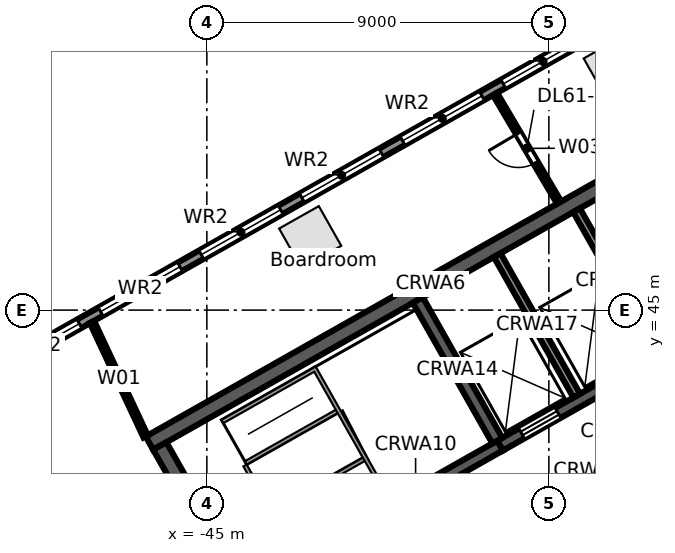
"""IFC4 building model, lengths in metres.
Left out: names, types, materials, properties, quantities, classifications, styles, units other than length and angle.
Written with IfcOpenShell. Run it as: python <this file> out.ifc"""

import sys

from ifc_helpers import new_model, si_unit, direction, frame, frame_2d, origin, origin_2d, place, context, subcontext, project, spatial, rectangle, extrude, element, fill, save


model = new_model("IFC4")
c1 = context("Model", 3, precision=1e-05, world=origin(), true_north=direction((0.0, 1.0)))
c2 = subcontext(c1, "Body", "Model", "MODEL_VIEW")
j1 = project(units=[si_unit("LENGTHUNIT", "METRE"), si_unit("PLANEANGLEUNIT", "RADIAN")], contexts=[c1])
p1 = place(None, origin())
s1 = spatial("IfcSite", under=j1, at=p1, CompositionType="ELEMENT")
p2 = place(p1, origin())
s2 = spatial("IfcBuilding", under=s1, at=p2, CompositionType="ELEMENT")
p3 = place(p2, frame((0.0, 0.0, 277.9)))
s3 = spatial("IfcBuildingStorey", under=s2, at=p3, CompositionType="ELEMENT", Elevation=277.9)
p4 = place(p3, frame((-34.334, 51.414, 0.0), z_axis=(0.0, 0.0, 1.0), x_axis=(-0.87035569594, -0.492423560103, 0.0)))
e1 = element("IfcColumn", 1, at=p4, inside=s3, PredefinedType="COLUMN", context=c2, shape_type="SweptSolid", body=[
    extrude(rectangle(XDim=1.1, YDim=1.1, at=origin_2d()), origin(), (0.0, 0.0, 1.0), 3.8),
])
p5 = place(p3, frame((-42.28, 46.919, 0.0), z_axis=(0.0, 0.0, 1.0), x_axis=(-0.87035569594, -0.492423560103, 0.0)))
e2 = element("IfcColumn", 2, at=p5, inside=s3, PredefinedType="COLUMN", context=c2, shape_type="SweptSolid", body=[
    extrude(rectangle(XDim=1.2, YDim=1.2, at=origin_2d()), origin(), (0.0, 0.0, 1.0), 3.8),
])
p6 = place(p3, frame((-58.732, 38.771, 0.0), z_axis=(0.0, 0.0, 1.0), x_axis=(0.870355615581, 0.492423702137, 0.0)))
e3 = element("IfcWall", 3, at=p6, inside=s3, PredefinedType="STANDARD", context=c2, shape_type="SweptSolid", body=[
    extrude(rectangle(XDim=64.052, YDim=0.25, at=frame_2d((32.026, 0.0))), origin(), (0.0, 0.0, 1.0), 3.52),
])
p7 = place(p6, frame((61.259, 0.0, 0.8)))
e4 = element("IfcOpeningElement", 4, at=p7, cuts=e3, PredefinedType="OPENING", context=c2, shape_type="SweptSolid", body=[
    extrude(rectangle(XDim=2.4, YDim=2.2, at=frame_2d((1.2, 1.1))), frame((0.0, 0.135, 0.0), z_axis=(0.0, -1.0, 0.0), x_axis=(1.0, 0.0, 0.0)), (0.0, 0.0, 1.0), 0.27),
])
p8 = place(p6, frame((58.216, 0.0, 0.8)))
e5 = element("IfcOpeningElement", 5, at=p8, cuts=e3, PredefinedType="OPENING", context=c2, shape_type="SweptSolid", body=[
    extrude(rectangle(XDim=2.4, YDim=2.2, at=frame_2d((1.2, 1.1))), frame((0.0, 0.135, 0.0), z_axis=(0.0, -1.0, 0.0), x_axis=(1.0, 0.0, 0.0)), (0.0, 0.0, 1.0), 0.27),
])
p9 = place(p6, frame((55.173, 0.0, 0.8)))
e6 = element("IfcOpeningElement", 6, at=p9, cuts=e3, PredefinedType="OPENING", context=c2, shape_type="SweptSolid", body=[
    extrude(rectangle(XDim=2.4, YDim=2.2, at=frame_2d((1.2, 1.1))), frame((0.0, 0.135, 0.0), z_axis=(0.0, -1.0, 0.0), x_axis=(1.0, 0.0, 0.0)), (0.0, 0.0, 1.0), 0.27),
])
p10 = place(p6, frame((52.129, 0.0, 0.8)))
e7 = element("IfcOpeningElement", 7, at=p10, cuts=e3, PredefinedType="OPENING", context=c2, shape_type="SweptSolid", body=[
    extrude(rectangle(XDim=2.4, YDim=2.2, at=frame_2d((1.2, 1.1))), frame((0.0, 0.135, 0.0), z_axis=(0.0, -1.0, 0.0), x_axis=(1.0, 0.0, 0.0)), (0.0, 0.0, 1.0), 0.27),
])
p11 = place(p6, frame((49.086, 0.0, 0.8)))
e8 = element("IfcOpeningElement", 8, at=p11, cuts=e3, PredefinedType="OPENING", context=c2, shape_type="SweptSolid", body=[
    extrude(rectangle(XDim=2.4, YDim=2.2, at=frame_2d((1.2, 1.1))), frame((0.0, 0.135, 0.0), z_axis=(0.0, -1.0, 0.0), x_axis=(1.0, 0.0, 0.0)), (0.0, 0.0, 1.0), 0.27),
])
p12 = place(p6, frame((46.043, 0.0, 0.8)))
e9 = element("IfcOpeningElement", 9, at=p12, cuts=e3, PredefinedType="OPENING", context=c2, shape_type="SweptSolid", body=[
    extrude(rectangle(XDim=2.4, YDim=2.2, at=frame_2d((1.2, 1.1))), frame((0.0, 0.135, 0.0), z_axis=(0.0, -1.0, 0.0), x_axis=(1.0, 0.0, 0.0)), (0.0, 0.0, 1.0), 0.27),
])
p13 = place(p6, frame((43.0, 0.0, 0.8)))
e10 = element("IfcOpeningElement", 10, at=p13, cuts=e3, PredefinedType="OPENING", context=c2, shape_type="SweptSolid", body=[
    extrude(rectangle(XDim=2.4, YDim=2.2, at=frame_2d((1.2, 1.1))), frame((0.0, 0.135, 0.0), z_axis=(0.0, -1.0, 0.0), x_axis=(1.0, 0.0, 0.0)), (0.0, 0.0, 1.0), 0.27),
])
p14 = place(p6, frame((39.956, 0.0, 0.8)))
e11 = element("IfcOpeningElement", 11, at=p14, cuts=e3, PredefinedType="OPENING", context=c2, shape_type="SweptSolid", body=[
    extrude(rectangle(XDim=2.4, YDim=2.2, at=frame_2d((1.2, 1.1))), frame((0.0, 0.135, 0.0), z_axis=(0.0, -1.0, 0.0), x_axis=(1.0, 0.0, 0.0)), (0.0, 0.0, 1.0), 0.27),
])
p15 = place(p6, frame((36.913, 0.0, 0.8)))
e12 = element("IfcOpeningElement", 12, at=p15, cuts=e3, PredefinedType="OPENING", context=c2, shape_type="SweptSolid", body=[
    extrude(rectangle(XDim=2.4, YDim=2.2, at=frame_2d((1.2, 1.1))), frame((0.0, 0.135, 0.0), z_axis=(0.0, -1.0, 0.0), x_axis=(1.0, 0.0, 0.0)), (0.0, 0.0, 1.0), 0.27),
])
p16 = place(p6, frame((33.87, 0.0, 0.8)))
e13 = element("IfcOpeningElement", 13, at=p16, cuts=e3, PredefinedType="OPENING", context=c2, shape_type="SweptSolid", body=[
    extrude(rectangle(XDim=2.4, YDim=2.2, at=frame_2d((1.2, 1.1))), frame((0.0, 0.135, 0.0), z_axis=(0.0, -1.0, 0.0), x_axis=(1.0, 0.0, 0.0)), (0.0, 0.0, 1.0), 0.27),
])
p17 = place(p6, frame((30.826, 0.0, 0.8)))
e14 = element("IfcOpeningElement", 14, at=p17, cuts=e3, PredefinedType="OPENING", context=c2, shape_type="SweptSolid", body=[
    extrude(rectangle(XDim=2.4, YDim=2.2, at=frame_2d((1.2, 1.1))), frame((0.0, 0.135, 0.0), z_axis=(0.0, -1.0, 0.0), x_axis=(1.0, 0.0, 0.0)), (0.0, 0.0, 1.0), 0.27),
])
p18 = place(p6, frame((27.783, 0.0, 0.8)))
e15 = element("IfcOpeningElement", 15, at=p18, cuts=e3, PredefinedType="OPENING", context=c2, shape_type="SweptSolid", body=[
    extrude(rectangle(XDim=2.4, YDim=2.2, at=frame_2d((1.2, 1.1))), frame((0.0, 0.135, 0.0), z_axis=(0.0, -1.0, 0.0), x_axis=(1.0, 0.0, 0.0)), (0.0, 0.0, 1.0), 0.27),
])
p19 = place(p6, frame((24.74, 0.0, 0.8)))
e16 = element("IfcOpeningElement", 16, at=p19, cuts=e3, PredefinedType="OPENING", context=c2, shape_type="SweptSolid", body=[
    extrude(rectangle(XDim=2.4, YDim=2.2, at=frame_2d((1.2, 1.1))), frame((0.0, 0.135, 0.0), z_axis=(0.0, -1.0, 0.0), x_axis=(1.0, 0.0, 0.0)), (0.0, 0.0, 1.0), 0.27),
])
p20 = place(p6, frame((21.696, 0.0, 0.8)))
e17 = element("IfcOpeningElement", 17, at=p20, cuts=e3, PredefinedType="OPENING", context=c2, shape_type="SweptSolid", body=[
    extrude(rectangle(XDim=2.4, YDim=2.2, at=frame_2d((1.2, 1.1))), frame((0.0, 0.135, 0.0), z_axis=(0.0, -1.0, 0.0), x_axis=(1.0, 0.0, 0.0)), (0.0, 0.0, 1.0), 0.27),
])
p21 = place(p6, frame((18.653, 0.0, 0.8)))
e18 = element("IfcOpeningElement", 18, at=p21, cuts=e3, PredefinedType="OPENING", context=c2, shape_type="SweptSolid", body=[
    extrude(rectangle(XDim=2.4, YDim=2.2, at=frame_2d((1.2, 1.1))), frame((0.0, 0.135, 0.0), z_axis=(0.0, -1.0, 0.0), x_axis=(1.0, 0.0, 0.0)), (0.0, 0.0, 1.0), 0.27),
])
p22 = place(p6, frame((15.61, 0.0, 0.8)))
e19 = element("IfcOpeningElement", 19, at=p22, cuts=e3, PredefinedType="OPENING", context=c2, shape_type="SweptSolid", body=[
    extrude(rectangle(XDim=2.4, YDim=2.2, at=frame_2d((1.2, 1.1))), frame((0.0, 0.135, 0.0), z_axis=(0.0, -1.0, 0.0), x_axis=(1.0, 0.0, 0.0)), (0.0, 0.0, 1.0), 0.27),
])
p23 = place(p6, frame((12.567, 0.0, 0.8)))
e20 = element("IfcOpeningElement", 20, at=p23, cuts=e3, PredefinedType="OPENING", context=c2, shape_type="SweptSolid", body=[
    extrude(rectangle(XDim=2.4, YDim=2.2, at=frame_2d((1.2, 1.1))), frame((0.0, 0.135, 0.0), z_axis=(0.0, -1.0, 0.0), x_axis=(1.0, 0.0, 0.0)), (0.0, 0.0, 1.0), 0.27),
])
p24 = place(p6, frame((9.523, 0.0, 0.8)))
e21 = element("IfcOpeningElement", 21, at=p24, cuts=e3, PredefinedType="OPENING", context=c2, shape_type="SweptSolid", body=[
    extrude(rectangle(XDim=2.4, YDim=2.2, at=frame_2d((1.2, 1.1))), frame((0.0, 0.135, 0.0), z_axis=(0.0, -1.0, 0.0), x_axis=(1.0, 0.0, 0.0)), (0.0, 0.0, 1.0), 0.27),
])
p25 = place(p6, frame((6.48, 0.0, 0.8)))
e22 = element("IfcOpeningElement", 22, at=p25, cuts=e3, PredefinedType="OPENING", context=c2, shape_type="SweptSolid", body=[
    extrude(rectangle(XDim=2.4, YDim=2.2, at=frame_2d((1.2, 1.1))), frame((0.0, 0.135, 0.0), z_axis=(0.0, -1.0, 0.0), x_axis=(1.0, 0.0, 0.0)), (0.0, 0.0, 1.0), 0.27),
])
p26 = place(p6, frame((3.437, 0.0, 0.8)))
e23 = element("IfcOpeningElement", 23, at=p26, cuts=e3, PredefinedType="OPENING", context=c2, shape_type="SweptSolid", body=[
    extrude(rectangle(XDim=2.4, YDim=2.2, at=frame_2d((1.2, 1.1))), frame((0.0, 0.135, 0.0), z_axis=(0.0, -1.0, 0.0), x_axis=(1.0, 0.0, 0.0)), (0.0, 0.0, 1.0), 0.27),
])
p27 = place(p6, frame((0.393, 0.0, 0.8)))
e24 = element("IfcOpeningElement", 24, at=p27, cuts=e3, PredefinedType="OPENING", context=c2, shape_type="SweptSolid", body=[
    extrude(rectangle(XDim=2.4, YDim=2.2, at=frame_2d((1.2, 1.1))), frame((0.0, 0.135, 0.0), z_axis=(0.0, -1.0, 0.0), x_axis=(1.0, 0.0, 0.0)), (0.0, 0.0, 1.0), 0.27),
])
p28 = place(p3, frame((-3.017, 46.293, 0.0), z_axis=(0.0, 0.0, 1.0), x_axis=(-0.870355474887, -0.492423950812, 0.0)))
e25 = element("IfcWall", 25, at=p28, inside=s3, PredefinedType="STANDARD", context=c2, shape_type="SweptSolid", body=[
    extrude(rectangle(XDim=40.34, YDim=0.25, at=frame_2d((20.17, 0.0))), origin(), (0.0, 0.0, 1.0), 3.52),
])
p29 = place(p28, frame((37.428, 0.0, 0.8)))
e26 = element("IfcOpeningElement", 26, at=p29, cuts=e25, PredefinedType="OPENING", context=c2, shape_type="SweptSolid", body=[
    extrude(rectangle(XDim=2.4, YDim=2.2, at=frame_2d((1.2, 1.1))), frame((0.0, 0.135, 0.0), z_axis=(0.0, -1.0, 0.0), x_axis=(1.0, 0.0, 0.0)), (0.0, 0.0, 1.0), 0.27),
])
p30 = place(p28, frame((34.372, 0.0, 0.0)))
e27 = element("IfcOpeningElement", 27, at=p30, cuts=e25, PredefinedType="OPENING", context=c2, shape_type="SweptSolid", body=[
    extrude(rectangle(XDim=1.8, YDim=2.4, at=frame_2d((0.9, 1.2))), frame((0.0, 0.135, 0.0), z_axis=(0.0, -1.0, 0.0), x_axis=(1.0, 0.0, 0.0)), (0.0, 0.0, 1.0), 0.27),
])
p31 = place(p28, frame((30.716, 0.0, 0.8)))
e28 = element("IfcOpeningElement", 28, at=p31, cuts=e25, PredefinedType="OPENING", context=c2, shape_type="SweptSolid", body=[
    extrude(rectangle(XDim=2.4, YDim=2.2, at=frame_2d((1.2, 1.1))), frame((0.0, 0.135, 0.0), z_axis=(0.0, -1.0, 0.0), x_axis=(1.0, 0.0, 0.0)), (0.0, 0.0, 1.0), 0.27),
])
p32 = place(p28, frame((27.36, 0.0, 0.8)))
e29 = element("IfcOpeningElement", 29, at=p32, cuts=e25, PredefinedType="OPENING", context=c2, shape_type="SweptSolid", body=[
    extrude(rectangle(XDim=2.4, YDim=2.2, at=frame_2d((1.2, 1.1))), frame((0.0, 0.135, 0.0), z_axis=(0.0, -1.0, 0.0), x_axis=(1.0, 0.0, 0.0)), (0.0, 0.0, 1.0), 0.27),
])
p33 = place(p28, frame((24.304, 0.0, 0.0)))
e30 = element("IfcOpeningElement", 30, at=p33, cuts=e25, PredefinedType="OPENING", context=c2, shape_type="SweptSolid", body=[
    extrude(rectangle(XDim=1.8, YDim=2.4, at=frame_2d((0.9, 1.2))), frame((0.0, 0.135, 0.0), z_axis=(0.0, -1.0, 0.0), x_axis=(1.0, 0.0, 0.0)), (0.0, 0.0, 1.0), 0.27),
])
p34 = place(p28, frame((20.648, 0.0, 0.8)))
e31 = element("IfcOpeningElement", 31, at=p34, cuts=e25, PredefinedType="OPENING", context=c2, shape_type="SweptSolid", body=[
    extrude(rectangle(XDim=2.4, YDim=2.2, at=frame_2d((1.2, 1.1))), frame((0.0, 0.135, 0.0), z_axis=(0.0, -1.0, 0.0), x_axis=(1.0, 0.0, 0.0)), (0.0, 0.0, 1.0), 0.27),
])
p35 = place(p28, frame((17.292, 0.0, 0.8)))
e32 = element("IfcOpeningElement", 32, at=p35, cuts=e25, PredefinedType="OPENING", context=c2, shape_type="SweptSolid", body=[
    extrude(rectangle(XDim=2.4, YDim=2.2, at=frame_2d((1.2, 1.1))), frame((0.0, 0.135, 0.0), z_axis=(0.0, -1.0, 0.0), x_axis=(1.0, 0.0, 0.0)), (0.0, 0.0, 1.0), 0.27),
])
p36 = place(p28, frame((14.236, 0.0, 0.0)))
e33 = element("IfcOpeningElement", 33, at=p36, cuts=e25, PredefinedType="OPENING", context=c2, shape_type="SweptSolid", body=[
    extrude(rectangle(XDim=1.8, YDim=2.4, at=frame_2d((0.9, 1.2))), frame((0.0, 0.135, 0.0), z_axis=(0.0, -1.0, 0.0), x_axis=(1.0, 0.0, 0.0)), (0.0, 0.0, 1.0), 0.27),
])
p37 = place(p28, frame((10.58, 0.0, 0.8)))
e34 = element("IfcOpeningElement", 34, at=p37, cuts=e25, PredefinedType="OPENING", context=c2, shape_type="SweptSolid", body=[
    extrude(rectangle(XDim=2.4, YDim=2.2, at=frame_2d((1.2, 1.1))), frame((0.0, 0.135, 0.0), z_axis=(0.0, -1.0, 0.0), x_axis=(1.0, 0.0, 0.0)), (0.0, 0.0, 1.0), 0.27),
])
p38 = place(p28, frame((7.224, 0.0, 0.8)))
e35 = element("IfcOpeningElement", 35, at=p38, cuts=e25, PredefinedType="OPENING", context=c2, shape_type="SweptSolid", body=[
    extrude(rectangle(XDim=2.4, YDim=2.2, at=frame_2d((1.2, 1.1))), frame((0.0, 0.135, 0.0), z_axis=(0.0, -1.0, 0.0), x_axis=(1.0, 0.0, 0.0)), (0.0, 0.0, 1.0), 0.27),
])
p39 = place(p28, frame((4.168, 0.0, 0.0)))
e36 = element("IfcOpeningElement", 36, at=p39, cuts=e25, PredefinedType="OPENING", context=c2, shape_type="SweptSolid", body=[
    extrude(rectangle(XDim=1.8, YDim=2.4, at=frame_2d((0.9, 1.2))), frame((0.0, 0.135, 0.0), z_axis=(0.0, -1.0, 0.0), x_axis=(1.0, 0.0, 0.0)), (0.0, 0.0, 1.0), 0.27),
])
p40 = place(p28, frame((0.512, 0.0, 0.8)))
e37 = element("IfcOpeningElement", 37, at=p40, cuts=e25, PredefinedType="OPENING", context=c2, shape_type="SweptSolid", body=[
    extrude(rectangle(XDim=2.4, YDim=2.2, at=frame_2d((1.2, 1.1))), frame((0.0, 0.135, 0.0), z_axis=(0.0, -1.0, 0.0), x_axis=(1.0, 0.0, 0.0)), (0.0, 0.0, 1.0), 0.27),
])
p41 = place(p3, frame((-43.897, 37.692, 0.0), z_axis=(0.0, 0.0, 1.0), x_axis=(0.870356351998, 0.492422400523, 0.0)))
e38 = element("IfcWall", 38, at=p41, inside=s3, PredefinedType="SOLIDWALL", context=c2, shape_type="SweptSolid", body=[
    extrude(rectangle(XDim=7.6, YDim=0.3, at=frame_2d((3.8, 0.0))), origin(), (0.0, 0.0, 1.0), 3.52),
])
p42 = place(p41, frame((0.4, 0.0, 0.0)))
e39 = element("IfcOpeningElement", 39, at=p42, cuts=e38, PredefinedType="OPENING", context=c2, shape_type="SweptSolid", body=[
    extrude(rectangle(XDim=1.0, YDim=2.1, at=frame_2d((0.5, 1.05))), frame((0.0, 0.16, 0.0), z_axis=(0.0, -1.0, 0.0), x_axis=(1.0, 0.0, 0.0)), (0.0, 0.0, 1.0), 0.32),
])
p43 = place(p3, frame((-37.282, 41.435, 0.0), z_axis=(0.0, 0.0, 1.0), x_axis=(0.870361315115, 0.492413628113, 0.0)))
e40 = element("IfcWall", 40, at=p43, inside=s3, PredefinedType="SOLIDWALL", context=c2, shape_type="SweptSolid", body=[
    extrude(rectangle(XDim=8.6, YDim=0.3, at=frame_2d((4.3, 0.0))), origin(), (0.0, 0.0, 1.0), 3.52),
])
p44 = place(p43, frame((0.65, 0.0, 0.0)))
e41 = element("IfcOpeningElement", 41, at=p44, cuts=e40, PredefinedType="OPENING", context=c2, shape_type="SweptSolid", body=[
    extrude(rectangle(XDim=1.1, YDim=2.1, at=frame_2d((0.55, 1.05))), frame((0.0, 0.16, 0.0), z_axis=(0.0, -1.0, 0.0), x_axis=(1.0, 0.0, 0.0)), (0.0, 0.0, 1.0), 0.32),
])
p45 = place(p43, frame((3.05, 0.0, 0.0)))
e42 = element("IfcOpeningElement", 42, at=p45, cuts=e40, PredefinedType="OPENING", context=c2, shape_type="SweptSolid", body=[
    extrude(rectangle(XDim=1.1, YDim=2.1, at=frame_2d((0.55, 1.05))), frame((0.0, 0.16, 0.0), z_axis=(0.0, -1.0, 0.0), x_axis=(1.0, 0.0, 0.0)), (0.0, 0.0, 1.0), 0.32),
])
p46 = place(p43, frame((6.2, 0.0, 0.0)))
e43 = element("IfcOpeningElement", 43, at=p46, cuts=e40, PredefinedType="OPENING", context=c2, shape_type="SweptSolid", body=[
    extrude(rectangle(XDim=1.1, YDim=2.1, at=frame_2d((0.55, 1.05))), frame((0.0, 0.16, 0.0), z_axis=(0.0, -1.0, 0.0), x_axis=(1.0, 0.0, 0.0)), (0.0, 0.0, 1.0), 0.32),
])
p47 = place(p3, frame((-46.51, 41.499, 0.0), z_axis=(0.0, 0.0, 1.0), x_axis=(0.870356271124, 0.492422543467, 0.0)))
e44 = element("IfcWall", 44, at=p47, inside=s3, PredefinedType="SOLIDWALL", context=c2, shape_type="SweptSolid", body=[
    extrude(rectangle(XDim=17.0, YDim=0.4, at=frame_2d((8.5, 0.0))), origin(), (0.0, 0.0, 1.0), 3.52),
])
p48 = place(p3, frame((-46.238, 41.423, 0.0), z_axis=(0.0, 0.0, 1.0), x_axis=(0.492421663121, -0.870356769198, 0.0)))
e45 = element("IfcWall", 45, at=p48, inside=s3, PredefinedType="SOLIDWALL", context=c2, shape_type="SweptSolid", body=[
    extrude(rectangle(XDim=13.2, YDim=0.4, at=frame_2d((6.6, 0.0))), origin(), (0.0, 0.0, 1.0), 3.52),
])
p49 = place(p3, frame((-39.449, 45.264, 0.0), z_axis=(0.0, 0.0, 1.0), x_axis=(0.492422543467, -0.870356271124, 0.0)))
e46 = element("IfcWall", 46, at=p49, inside=s3, PredefinedType="SOLIDWALL", context=c2, shape_type="SweptSolid", body=[
    extrude(rectangle(XDim=4.25, YDim=0.3, at=frame_2d((2.125, 0.0))), origin(), (0.0, 0.0, 1.0), 3.52),
])
for number, where, z_axis, x_axis in (
    (47, (-37.36, 46.446, 0.0), (0.0, 0.0, 1.0), (0.492, -0.87, 0.0)),
    (48, (-35.271, 47.628, 0.0), (0.0, 0.0, 1.0), (0.492, -0.87, 0.0)),
):
    element("IfcWall", number, at=place(p3, frame(where, z_axis=z_axis, x_axis=x_axis)), inside=s3, PredefinedType="SOLIDWALL", context=c2, shape_type="SweptSolid", body=[
        extrude(rectangle(XDim=4.25, YDim=0.2, at=frame_2d((2.125, 0.0))), origin(), (0.0, 0.0, 1.0), 3.52),
    ])
p50 = place(p3, frame((-48.022, 44.687, 0.0), z_axis=(0.0, 0.0, 1.0), x_axis=(0.424510917438, -0.905422818895, 0.0)))
e49 = element("IfcWall", 49, at=p50, inside=s3, PredefinedType="PARTITIONING", context=c2, shape_type="SweptSolid", body=[
    extrude(rectangle(XDim=3.329, YDim=0.125, at=frame_2d((1.665, 0.0))), origin(), (0.0, 0.0, 1.0), 2.888),
])
p51 = place(p3, frame((-37.416, 50.687, 0.0), z_axis=(0.0, 0.0, 1.0), x_axis=(0.508176683483, -0.861252842297, 0.0)))
e50 = element("IfcWall", 50, at=p51, inside=s3, PredefinedType="PARTITIONING", context=c2, shape_type="SweptSolid", body=[
    extrude(rectangle(XDim=3.32, YDim=0.125, at=frame_2d((1.66, 0.0))), origin(), (0.0, 0.0, 1.0), 2.888),
])
p52 = place(p51, frame((1.2, 0.0, 0.0)))
e51 = element("IfcOpeningElement", 51, at=p52, cuts=e50, PredefinedType="OPENING", context=c2, shape_type="SweptSolid", body=[
    extrude(rectangle(XDim=0.9, YDim=2.1, at=frame_2d((0.45, 1.05))), frame((0.0, 0.073, 0.0), z_axis=(0.0, -1.0, 0.0), x_axis=(1.0, 0.0, 0.0)), (0.0, 0.0, 1.0), 0.145),
])
p53 = place(p19, origin())
e52 = element("IfcWindow", 52, at=p53, inside=s3, PartitioningType="SINGLE_PANEL", PredefinedType="WINDOW", context=c2, shape_type="SweptSolid", body=[
    extrude(rectangle(XDim=2.4, YDim=2.2, at=frame_2d((1.2, 1.1))), frame((0.0, 0.03, 0.0), z_axis=(0.0, -1.0, 0.0), x_axis=(1.0, 0.0, 0.0)), (0.0, 0.0, 1.0), 0.06),
])
fill(e16, e52)
p54 = place(p20, origin())
e53 = element("IfcWindow", 53, at=p54, inside=s3, PartitioningType="SINGLE_PANEL", PredefinedType="WINDOW", context=c2, shape_type="SweptSolid", body=[
    extrude(rectangle(XDim=2.4, YDim=2.2, at=frame_2d((1.2, 1.1))), frame((0.0, 0.03, 0.0), z_axis=(0.0, -1.0, 0.0), x_axis=(1.0, 0.0, 0.0)), (0.0, 0.0, 1.0), 0.06),
])
fill(e17, e53)
p55 = place(p21, origin())
e54 = element("IfcWindow", 54, at=p55, inside=s3, PartitioningType="SINGLE_PANEL", PredefinedType="WINDOW", context=c2, shape_type="SweptSolid", body=[
    extrude(rectangle(XDim=2.4, YDim=2.2, at=frame_2d((1.2, 1.1))), frame((0.0, 0.03, 0.0), z_axis=(0.0, -1.0, 0.0), x_axis=(1.0, 0.0, 0.0)), (0.0, 0.0, 1.0), 0.06),
])
fill(e18, e54)
p56 = place(p22, origin())
e55 = element("IfcWindow", 55, at=p56, inside=s3, PartitioningType="SINGLE_PANEL", PredefinedType="WINDOW", context=c2, shape_type="SweptSolid", body=[
    extrude(rectangle(XDim=2.4, YDim=2.2, at=frame_2d((1.2, 1.1))), frame((0.0, 0.03, 0.0), z_axis=(0.0, -1.0, 0.0), x_axis=(1.0, 0.0, 0.0)), (0.0, 0.0, 1.0), 0.06),
])
fill(e19, e55)
p57 = place(p23, origin())
e56 = element("IfcWindow", 56, at=p57, inside=s3, PartitioningType="SINGLE_PANEL", PredefinedType="WINDOW", context=c2, shape_type="SweptSolid", body=[
    extrude(rectangle(XDim=2.4, YDim=2.2, at=frame_2d((1.2, 1.1))), frame((0.0, 0.03, 0.0), z_axis=(0.0, -1.0, 0.0), x_axis=(1.0, 0.0, 0.0)), (0.0, 0.0, 1.0), 0.06),
])
fill(e20, e56)
p58 = place(p24, origin())
e57 = element("IfcWindow", 57, at=p58, inside=s3, PartitioningType="SINGLE_PANEL", PredefinedType="WINDOW", context=c2, shape_type="SweptSolid", body=[
    extrude(rectangle(XDim=2.4, YDim=2.2, at=frame_2d((1.2, 1.1))), frame((0.0, 0.03, 0.0), z_axis=(0.0, -1.0, 0.0), x_axis=(1.0, 0.0, 0.0)), (0.0, 0.0, 1.0), 0.06),
])
fill(e21, e57)
p59 = place(p44, origin())
e58 = element("IfcDoor", 58, at=p59, inside=s3, OperationType="DOUBLE_DOOR_SLIDING", PredefinedType="DOOR", context=c2, shape_type="SweptSolid", body=[
    extrude(rectangle(XDim=1.1, YDim=2.1, at=frame_2d((0.55, 1.05))), frame((0.0, 0.025, 0.0), z_axis=(0.0, -1.0, 0.0), x_axis=(1.0, 0.0, 0.0)), (0.0, 0.0, 1.0), 0.05),
])
fill(e41, e58)
p60 = place(p52, frame((0.9, 0.0, 0.0), z_axis=(0.0, 0.0, 1.0), x_axis=(-1.0, 0.0, 0.0)))
e59 = element("IfcDoor", 59, at=p60, inside=s3, OperationType="SINGLE_SWING_RIGHT", PredefinedType="DOOR", context=c2, shape_type="SweptSolid", body=[
    extrude(rectangle(XDim=0.9, YDim=2.1, at=frame_2d((0.45, 1.05))), frame((0.0, 0.025, 0.0), z_axis=(0.0, -1.0, 0.0), x_axis=(1.0, 0.0, 0.0)), (0.0, 0.0, 1.0), 0.05),
])
fill(e51, e59)
save(model, sys.argv[1])
